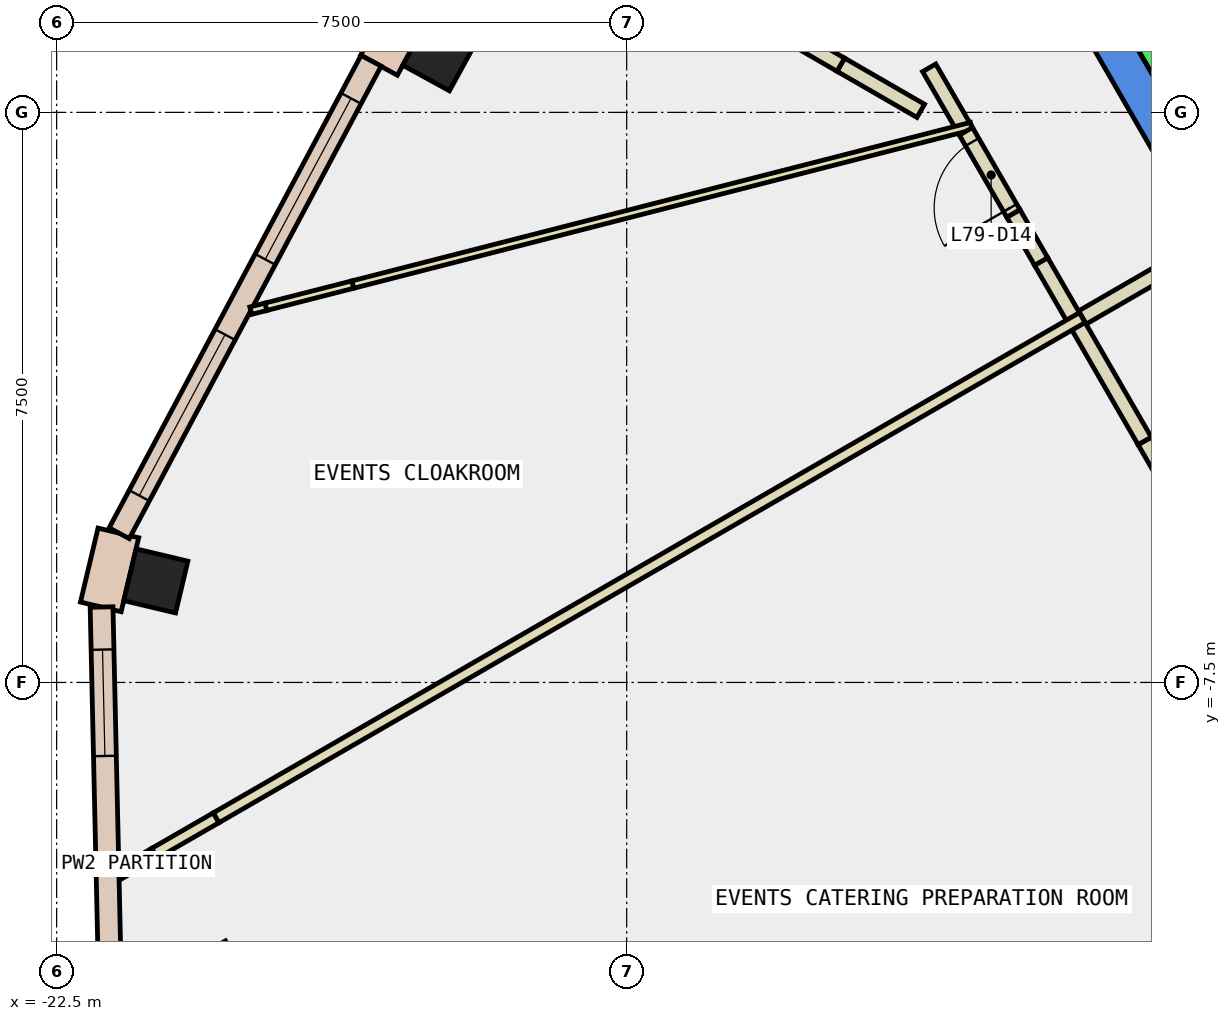
"""IFC4 building model, lengths in metres.
Left out: names, types, materials, properties, quantities, classifications, styles, units other than length and angle.
Written with IfcOpenShell. Run it as: python <this file> out.ifc"""

import sys

from ifc_helpers import new_model, si_unit, direction, frame, frame_2d, origin, origin_2d, place, context, subcontext, project, spatial, polyline, rectangle, outline, extrude, element, fill, save


model = new_model("IFC4")
c1 = context("Model", 3, precision=1e-05, world=origin(), true_north=direction((0.0, 1.0)))
c2 = subcontext(c1, "Body", "Model", "MODEL_VIEW")
j1 = project(units=[si_unit("LENGTHUNIT", "METRE"), si_unit("PLANEANGLEUNIT", "RADIAN")], contexts=[c1])
p1 = place(None, origin())
s1 = spatial("IfcSite", under=j1, at=p1, CompositionType="ELEMENT")
p2 = place(p1, origin())
s2 = spatial("IfcBuilding", under=s1, at=p2, CompositionType="ELEMENT")
p3 = place(p2, frame((0.0, 0.0, 335.9)))
s3 = spatial("IfcBuildingStorey", under=s2, at=p3, CompositionType="ELEMENT", Elevation=335.9)
for number, where, z_axis, x_axis in (
    (1, (-17.471, 0.759, -0.35), (0.0, 0.0, 1.0), (0.48, 0.877, 0.0)),
    (2, (-21.195, -6.164, -0.35), (0.0, 0.0, 1.0), (0.232, 0.973, 0.0)),
):
    element("IfcColumn", number, at=place(p3, frame(where, z_axis=z_axis, x_axis=x_axis)), inside=s3, PredefinedType="COLUMN", context=c2, shape_type="SweptSolid", body=[
        extrude(rectangle(XDim=0.7, YDim=0.7, at=origin_2d()), origin(), (0.0, 0.0, 1.0), 4.4),
    ])
p4 = place(p3, frame((-20.535, -11.856, -0.35), z_axis=(0.0, 0.0, 1.0), x_axis=(0.866025403784, 0.5, 0.0)))
e3 = element("IfcColumn", 3, at=p4, inside=s3, PredefinedType="COLUMN", context=c2, shape_type="SweptSolid", body=[
    extrude(rectangle(XDim=1.4, YDim=1.4, at=origin_2d()), origin(), (0.0, 0.0, 1.0), 4.4),
])
p5 = place(p3, frame((0.0, 0.0, -0.35)))
e4 = element("IfcWall", 4, at=p5, inside=s3, PredefinedType="SHEAR", context=c2, shape_type="SweptSolid", body=[
    extrude(outline(polyline([(-9.815, 2.5), (-4.907, -6.0), (-4.619, -5.5), (-9.238, 2.5), (-9.815, 2.5)])), origin(), (0.0, 0.0, 1.0), 4.4),
])
p6 = place(p3, frame((-17.779, 1.497, 0.0), z_axis=(0.0, 0.0, 1.0), x_axis=(-0.480117793957, -0.877204026396, 0.0)))
e5 = element("IfcWall", 5, at=p6, inside=s3, PredefinedType="STANDARD", context=c2, shape_type="SweptSolid", body=[
    extrude(rectangle(XDim=1.0, YDim=0.55, at=frame_2d((0.5, 0.0))), origin(), (0.0, 0.0, 1.0), 4.05),
])
p7 = place(p3, frame((-21.688, -5.533, 0.0), z_axis=(0.0, 0.0, 1.0), x_axis=(-0.230916459446, -0.972973580709, 0.0)))
e6 = element("IfcWall", 6, at=p7, inside=s3, PredefinedType="STANDARD", context=c2, shape_type="SweptSolid", body=[
    extrude(rectangle(XDim=1.0, YDim=0.55, at=frame_2d((0.5, 0.0))), origin(), (0.0, 0.0, 1.0), 4.05),
])
p8 = place(p3, frame((-18.363, 0.679, 0.0), z_axis=(0.0, 0.0, 1.0), x_axis=(-0.470447918342, -0.882427762555, 0.0)))
e7 = element("IfcWall", 7, at=p8, inside=s3, PredefinedType="STANDARD", context=c2, shape_type="SweptSolid", body=[
    extrude(rectangle(XDim=7.044, YDim=0.3, at=frame_2d((3.522, 0.0))), origin(), (0.0, 0.0, 1.0), 4.05),
])
p9 = place(p8, frame((0.561, 0.0, 0.9)))
e8 = element("IfcOpeningElement", 8, at=p9, cuts=e7, PredefinedType="OPENING", context=c2, shape_type="SweptSolid", body=[
    extrude(rectangle(XDim=2.4, YDim=3.0, at=frame_2d((1.2, 1.5))), frame((0.0, 0.16, 0.0), z_axis=(0.0, -1.0, 0.0), x_axis=(1.0, 0.0, 0.0)), (0.0, 0.0, 1.0), 0.32),
])
p10 = place(p8, frame((4.083, 0.0, 0.9)))
e9 = element("IfcOpeningElement", 9, at=p10, cuts=e7, PredefinedType="OPENING", context=c2, shape_type="SweptSolid", body=[
    extrude(rectangle(XDim=2.4, YDim=3.0, at=frame_2d((1.2, 1.5))), frame((0.0, 0.16, 0.0), z_axis=(0.0, -1.0, 0.0), x_axis=(1.0, 0.0, 0.0)), (0.0, 0.0, 1.0), 0.32),
])
p11 = place(p3, frame((-21.909, -6.508, 0.0), z_axis=(0.0, 0.0, 1.0), x_axis=(0.022431960078, -0.999748371925, 0.0)))
e10 = element("IfcWall", 10, at=p11, inside=s3, PredefinedType="STANDARD", context=c2, shape_type="SweptSolid", body=[
    extrude(rectangle(XDim=5.039, YDim=0.3, at=frame_2d((2.52, 0.0))), origin(), (0.0, 0.0, 1.0), 4.05),
])
p12 = place(p11, frame((0.56, 0.0, 0.9)))
e11 = element("IfcOpeningElement", 11, at=p12, cuts=e10, PredefinedType="OPENING", context=c2, shape_type="SweptSolid", body=[
    extrude(rectangle(XDim=1.4, YDim=3.0, at=frame_2d((0.7, 1.5))), frame((0.0, 0.16, 0.0), z_axis=(0.0, -1.0, 0.0), x_axis=(1.0, 0.0, 0.0)), (0.0, 0.0, 1.0), 0.32),
])
p13 = place(p3, frame((-9.006, -2.7, 0.0), z_axis=(0.0, 0.0, 1.0), x_axis=(0.865980106173, 0.500078449558, 0.0)))
e12 = element("IfcWall", 12, at=p13, inside=s3, PredefinedType="PARTITIONING", context=c2, shape_type="SweptSolid", body=[
    extrude(rectangle(XDim=1.9, YDim=0.2, at=frame_2d((0.95, 0.0))), origin(), (0.0, 0.0, 1.0), 4.05),
])
p14 = place(p3, frame((-21.68, -10.018, 0.0), z_axis=(0.0, 0.0, 1.0), x_axis=(0.866178063635, 0.499735492113, 0.0)))
e13 = element("IfcWall", 13, at=p14, inside=s3, PredefinedType="PARTITIONING", context=c2, shape_type="SweptSolid", body=[
    extrude(rectangle(XDim=0.54, YDim=0.15, at=frame_2d((0.27, 0.0))), origin(), (0.0, 0.0, 1.0), 4.05),
])
p15 = place(p3, frame((-11.131, 0.02, 0.0), z_axis=(0.0, 0.0, 1.0), x_axis=(-0.866182239464, 0.499728254191, 0.0)))
e14 = element("IfcWall", 14, at=p15, inside=s3, PredefinedType="PARTITIONING", context=c2, shape_type="SweptSolid", body=[
    extrude(rectangle(XDim=1.215, YDim=0.2, at=frame_2d((0.607, 0.0))), origin(), (0.0, 0.0, 1.0), 4.05),
])
p16 = place(p3, frame((-10.537, -0.249, 0.0), z_axis=(0.0, 0.0, 1.0), x_axis=(-0.50065707842, 0.865645706873, 0.0)))
e15 = element("IfcWall", 15, at=p16, inside=s3, PredefinedType="PARTITIONING", context=c2, shape_type="SweptSolid", body=[
    extrude(rectangle(XDim=0.965, YDim=0.2, at=frame_2d((0.482, 0.0))), origin(), (0.0, 0.0, 1.0), 4.05),
])
p17 = place(p3, frame((-9.105, -2.728, 0.0), z_axis=(0.0, 0.0, 1.0), x_axis=(-0.499849883363, 0.866112056319, 0.0)))
e16 = element("IfcWall", 16, at=p17, inside=s3, PredefinedType="PARTITIONING", context=c2, shape_type="SweptSolid", body=[
    extrude(rectangle(XDim=0.885, YDim=0.2, at=frame_2d((0.442, 0.0))), origin(), (0.0, 0.0, 1.0), 4.05),
])
p18 = place(p3, frame((-10.465, -0.181, 0.0), z_axis=(0.0, 0.0, 1.0), x_axis=(-0.968719585482, -0.248157943061, 0.0)))
e17 = element("IfcWall", 17, at=p18, inside=s3, PredefinedType="PARTITIONING", context=c2, shape_type="SweptSolid", body=[
    extrude(rectangle(XDim=8.403, YDim=0.1, at=frame_2d((4.201, 0.0))), origin(), (0.0, 0.0, 1.0), 4.05),
])
p19 = place(p3, frame((-7.835, -4.928, 0.0), z_axis=(0.0, 0.0, 1.0), x_axis=(-0.500265973451, 0.865871789474, 0.0)))
e18 = element("IfcWall", 18, at=p19, inside=s3, PredefinedType="PARTITIONING", context=c2, shape_type="SweptSolid", body=[
    extrude(rectangle(XDim=0.7, YDim=0.2, at=frame_2d((0.35, 0.0))), origin(), (0.0, 0.0, 1.0), 1.95),
])
p20 = place(p3, frame((-8.185, -4.322, 0.0), z_axis=(0.0, 0.0, 1.0), x_axis=(-0.499848773445, 0.866112696874, 0.0)))
e19 = element("IfcWall", 19, at=p20, inside=s3, PredefinedType="PARTITIONING", context=c2, shape_type="SweptSolid", body=[
    extrude(rectangle(XDim=1.84, YDim=0.2, at=frame_2d((0.92, 0.0))), origin(), (0.0, 0.0, 1.0), 4.05),
])
p21 = place(p3, frame((-21.212, -9.748, 0.0), z_axis=(0.0, 0.0, 1.0), x_axis=(0.866133493915, 0.499812735651, 0.0)))
e20 = element("IfcWall", 20, at=p21, inside=s3, PredefinedType="PARTITIONING", context=c2, shape_type="SweptSolid", body=[
    extrude(rectangle(XDim=0.936, YDim=0.15, at=frame_2d((0.468, 0.0))), origin(), (0.0, 0.0, 1.0), 1.95),
])
p22 = place(p3, frame((-20.401, -9.28, 0.0), z_axis=(0.0, 0.0, 1.0), x_axis=(0.865982571061, 0.500074181116, 0.0)))
e21 = element("IfcWall", 21, at=p22, inside=s3, PredefinedType="PARTITIONING", context=c2, shape_type="SweptSolid", body=[
    extrude(rectangle(XDim=13.158, YDim=0.15, at=frame_2d((6.579, 0.0))), origin(), (0.0, 0.0, 1.0), 4.05),
])
p23 = place(p3, frame((-12.183, 0.627, 0.0), z_axis=(0.0, 0.0, 1.0), x_axis=(-0.865759938798, 0.500459517216, 0.0)))
e22 = element("IfcWall", 22, at=p23, inside=s3, PredefinedType="PARTITIONING", context=c2, shape_type="SweptSolid", body=[
    extrude(rectangle(XDim=1.185, YDim=0.2, at=frame_2d((0.593, 0.0))), origin(), (0.0, 0.0, 1.0), 1.95),
])
p24 = place(p3, frame((-9.547, -1.962, 0.0), z_axis=(0.0, 0.0, 1.0), x_axis=(-0.500205129465, 0.865906939836, 0.0)))
e23 = element("IfcWall", 23, at=p24, inside=s3, PredefinedType="PARTITIONING", context=c2, shape_type="SweptSolid", body=[
    extrude(rectangle(XDim=0.73, YDim=0.2, at=frame_2d((0.365, 0.0))), origin(), (0.0, 0.0, 1.0), 1.95),
])
p25 = place(p3, frame((-9.912, -1.33, 0.0), z_axis=(0.0, 0.0, 1.0), x_axis=(-0.500512107711, 0.865729536307, 0.0)))
e24 = element("IfcWall", 24, at=p25, inside=s3, PredefinedType="PARTITIONING", context=c2, shape_type="SweptSolid", body=[
    extrude(rectangle(XDim=1.249, YDim=0.2, at=frame_2d((0.625, 0.0))), origin(), (0.0, 0.0, 1.0), 4.05),
])
p26 = place(p25, frame((0.085, 0.0, 0.0)))
e25 = element("IfcOpeningElement", 25, at=p26, cuts=e24, PredefinedType="OPENING", context=c2, shape_type="SweptSolid", body=[
    extrude(rectangle(XDim=1.0, YDim=2.1, at=frame_2d((0.5, 1.05))), frame((0.0, 0.11, 0.0), z_axis=(0.0, -1.0, 0.0), x_axis=(1.0, 0.0, 0.0)), (0.0, 0.0, 1.0), 0.22),
])
p27 = place(p3, frame((-18.605, -2.266, 0.0), z_axis=(0.0, 0.0, 1.0), x_axis=(-0.968888153569, -0.247498981561, 0.0)))
e26 = element("IfcWall", 26, at=p27, inside=s3, PredefinedType="PARTITIONING", context=c2, shape_type="SweptSolid", body=[
    extrude(rectangle(XDim=1.18, YDim=0.1, at=frame_2d((0.59, 0.0))), origin(), (0.0, 0.0, 1.0), 1.95),
])
p28 = place(p3, frame((-19.748, -2.558, 0.0), z_axis=(0.0, 0.0, 1.0), x_axis=(-0.968649127898, -0.248432821952, 0.0)))
e27 = element("IfcWall", 27, at=p28, inside=s3, PredefinedType="PARTITIONING", context=c2, shape_type="SweptSolid", body=[
    extrude(rectangle(XDim=0.204, YDim=0.1, at=frame_2d((0.102, 0.0))), origin(), (0.0, 0.0, 1.0), 4.05),
])
p29 = place(p3, frame((-8.192, 0.888, 0.0), z_axis=(0.0, 0.0, 1.0), x_axis=(0.500034260056, -0.866005622828, 0.0)))
e28 = element("IfcWall", 28, at=p29, inside=s3, PredefinedType="STANDARD", context=c2, shape_type="SweptSolid", body=[
    extrude(rectangle(XDim=5.399, YDim=0.2, at=frame_2d((2.7, 0.0))), origin(), (0.0, 0.0, 1.0), 4.05),
])
p30 = place(p3, frame((-5.977, 2.052, 0.0), z_axis=(0.0, 0.0, 1.0), x_axis=(-0.865973769406, -0.500089422704, 0.0)))
e29 = element("IfcWall", 29, at=p30, inside=s3, PredefinedType="STANDARD", context=c2, shape_type="SweptSolid", body=[
    extrude(rectangle(XDim=2.399, YDim=0.2, at=frame_2d((1.2, 0.0))), origin(), (0.0, 0.0, 1.0), 4.05),
])
p31 = place(p9, origin())
e30 = element("IfcWindow", 30, at=p31, inside=s3, PartitioningType="SINGLE_PANEL", PredefinedType="WINDOW", context=c2, shape_type="SweptSolid", body=[
    extrude(rectangle(XDim=2.4, YDim=3.0, at=frame_2d((1.2, 1.5))), frame((0.0, 0.03, 0.0), z_axis=(0.0, -1.0, 0.0), x_axis=(1.0, 0.0, 0.0)), (0.0, 0.0, 1.0), 0.06),
])
fill(e8, e30)
p32 = place(p10, origin())
e31 = element("IfcWindow", 31, at=p32, inside=s3, PartitioningType="SINGLE_PANEL", PredefinedType="WINDOW", context=c2, shape_type="SweptSolid", body=[
    extrude(rectangle(XDim=2.4, YDim=3.0, at=frame_2d((1.2, 1.5))), frame((0.0, 0.03, 0.0), z_axis=(0.0, -1.0, 0.0), x_axis=(1.0, 0.0, 0.0)), (0.0, 0.0, 1.0), 0.06),
])
fill(e9, e31)
p33 = place(p12, origin())
e32 = element("IfcWindow", 32, at=p33, inside=s3, PartitioningType="SINGLE_PANEL", PredefinedType="WINDOW", context=c2, shape_type="SweptSolid", body=[
    extrude(rectangle(XDim=1.4, YDim=3.0, at=frame_2d((0.7, 1.5))), frame((0.0, 0.03, 0.0), z_axis=(0.0, -1.0, 0.0), x_axis=(1.0, 0.0, 0.0)), (0.0, 0.0, 1.0), 0.06),
])
fill(e11, e32)
p34 = place(p26, origin())
e33 = element("IfcDoor", 33, at=p34, inside=s3, OperationType="SINGLE_SWING_LEFT", PredefinedType="DOOR", context=c2, shape_type="SweptSolid", body=[
    extrude(rectangle(XDim=1.0, YDim=2.1, at=frame_2d((0.5, 1.05))), frame((0.0, 0.025, 0.0), z_axis=(0.0, -1.0, 0.0), x_axis=(1.0, 0.0, 0.0)), (0.0, 0.0, 1.0), 0.05),
])
fill(e25, e33)
save(model, sys.argv[1])
